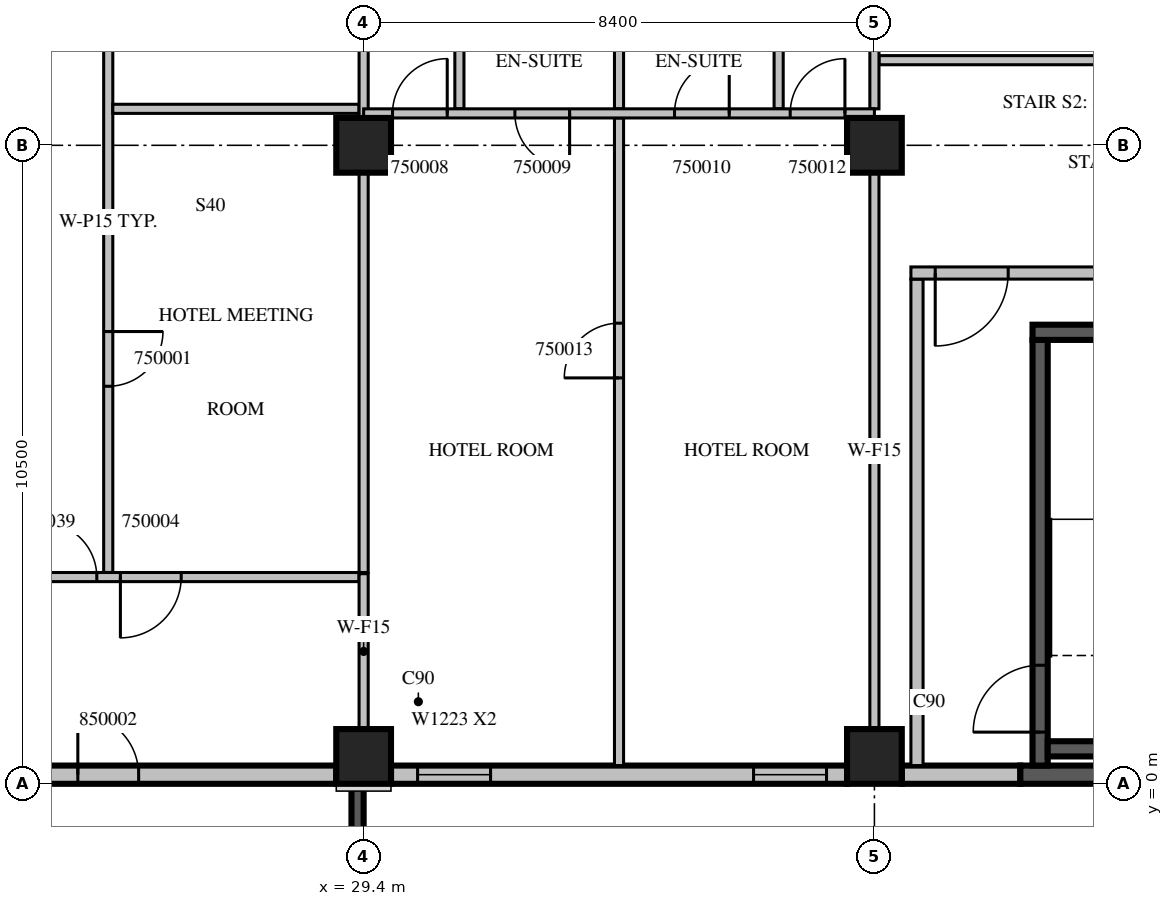
"""IFC4 building model, lengths in metres.
Left out: names, types, materials, properties, quantities, classifications, styles, units other than length and angle.
Written with IfcOpenShell. Run it as: python <this file> out.ifc"""

import sys

from ifc_helpers import new_model, si_unit, direction, frame, frame_2d, origin, origin_2d, place, context, subcontext, project, spatial, rectangle, extrude, source, transform, mapped, element, fill, save


model = new_model("IFC4")
c1 = context("Model", 3, precision=1e-05, world=origin(), true_north=direction((0.0, 1.0)))
c2 = subcontext(c1, "Body", "Model", "MODEL_VIEW")
j1 = project(units=[si_unit("LENGTHUNIT", "METRE"), si_unit("PLANEANGLEUNIT", "RADIAN")], contexts=[c1])
p1 = place(None, origin())
s1 = spatial("IfcSite", under=j1, at=p1, CompositionType="ELEMENT")
p2 = place(p1, origin())
s2 = spatial("IfcBuilding", under=s1, at=p2, CompositionType="ELEMENT")
p3 = place(p2, frame((0.0, 0.0, 223.4)))
s3 = spatial("IfcBuildingStorey", under=s2, at=p3, CompositionType="ELEMENT", Elevation=223.4)
m1 = source(origin(), c2, "Body", "SweptSolid", [
    extrude(rectangle(XDim=0.9, YDim=0.9, at=origin_2d()), origin(), (0.0, 0.0, 1.0), 3.8),
])
for number, where, z_axis, x_axis in (
    (1, (29.4, 0.45, 0.0), (0.0, 0.0, 1.0), (1.0, 0.0, 0.0)),
    (2, (37.8, 0.45, 0.0), (0.0, 0.0, 1.0), (1.0, 0.0, 0.0)),
    (3, (29.4, 10.5, 0.0), (0.0, 0.0, 1.0), (1.0, 0.0, 0.0)),
    (4, (37.8, 10.5, 0.0), (0.0, 0.0, 1.0), (1.0, 0.0, 0.0)),
):
    element("IfcColumn", number, at=place(p3, frame(where, z_axis=z_axis, x_axis=x_axis)), inside=s3, PredefinedType="COLUMN", context=c2, shape_type="MappedRepresentation", body=[
        mapped(m1, transform((0.0, 0.0, 0.0), scale=1.0)),
    ])
m2 = source(origin(), c2, "Body", "SweptSolid", [
    extrude(rectangle(XDim=3.9, YDim=0.2, at=frame_2d((1.95, 0.0))), origin(), (0.0, 0.0, 1.0), 3.4),
])
p4 = place(p3, frame((29.3, 0.0, 0.0), z_axis=(0.0, 0.0, 1.0), x_axis=(0.0, -1.0, 0.0)))
e5 = element("IfcWall", 5, at=p4, inside=s3, PredefinedType="SOLIDWALL", context=c2, shape_type="MappedRepresentation", body=[
    mapped(m2, transform((0.0, 0.0, 0.0), scale=1.0)),
])
m3 = source(origin(), c2, "Body", "SweptSolid", [
    extrude(rectangle(XDim=2.4, YDim=2.3, at=frame_2d((1.2, 1.15))), frame((0.0, 0.11, 0.0), z_axis=(0.0, -1.0, 0.0), x_axis=(1.0, 0.0, 0.0)), (0.0, 0.0, 1.0), 0.22),
])
p5 = place(p4, frame((0.75, 0.0, 0.6)))
e6 = element("IfcOpeningElement", 6, at=p5, cuts=e5, PredefinedType="OPENING", context=c2, shape_type="MappedRepresentation", body=[
    mapped(m3, transform((0.0, 0.0, 0.0), scale=1.0)),
])
m4 = source(origin(), c2, "Body", "SweptSolid", [
    extrude(rectangle(XDim=7.5, YDim=0.3, at=frame_2d((3.75, 0.0))), origin(), (0.0, 0.0, 1.0), 3.4),
])
p6 = place(p3, frame((21.45, 0.15, 0.0), z_axis=(0.0, 0.0, 1.0), x_axis=(1.0, 0.0, 0.0)))
e7 = element("IfcWall", 7, at=p6, inside=s3, PredefinedType="STANDARD", context=c2, shape_type="MappedRepresentation", body=[
    mapped(m4, transform((0.0, 0.0, 0.0), scale=1.0)),
])
m5 = source(origin(), c2, "Body", "SweptSolid", [
    extrude(rectangle(XDim=1.0, YDim=2.1, at=frame_2d((0.5, 1.05))), frame((0.0, 0.16, 0.0), z_axis=(0.0, -1.0, 0.0), x_axis=(1.0, 0.0, 0.0)), (0.0, 0.0, 1.0), 0.32),
])
p7 = place(p6, frame((3.25, 0.0, 0.0)))
e8 = element("IfcOpeningElement", 8, at=p7, cuts=e7, PredefinedType="OPENING", context=c2, shape_type="MappedRepresentation", body=[
    mapped(m5, transform((0.0, 0.0, 0.0), scale=1.0)),
])
p8 = place(p3, frame((29.85, 0.15, 0.0), z_axis=(0.0, 0.0, 1.0), x_axis=(1.0, 0.0, 0.0)))
e9 = element("IfcWall", 9, at=p8, inside=s3, PredefinedType="STANDARD", context=c2, shape_type="MappedRepresentation", body=[
    mapped(m4, transform((0.0, 0.0, 0.0), scale=1.0)),
])
m6 = source(origin(), c2, "Body", "SweptSolid", [
    extrude(rectangle(XDim=1.2, YDim=2.3, at=frame_2d((0.6, 1.15))), frame((0.0, 0.16, 0.0), z_axis=(0.0, -1.0, 0.0), x_axis=(1.0, 0.0, 0.0)), (0.0, 0.0, 1.0), 0.32),
])
p9 = place(p8, frame((0.438, 0.0, 0.6)))
e10 = element("IfcOpeningElement", 10, at=p9, cuts=e9, PredefinedType="OPENING", context=c2, shape_type="MappedRepresentation", body=[
    mapped(m6, transform((0.0, 0.0, 0.0), scale=1.0)),
])
p10 = place(p8, frame((5.963, 0.0, 0.6)))
e11 = element("IfcOpeningElement", 11, at=p10, cuts=e9, PredefinedType="OPENING", context=c2, shape_type="MappedRepresentation", body=[
    mapped(m6, transform((0.0, 0.0, 0.0), scale=1.0)),
])
m7 = source(origin(), c2, "Body", "SweptSolid", [
    extrude(rectangle(XDim=1.95, YDim=0.3, at=frame_2d((0.975, 0.0))), origin(), (0.0, 0.0, 1.0), 3.4),
])
p11 = place(p3, frame((38.25, 0.15, 0.0), z_axis=(0.0, 0.0, 1.0), x_axis=(1.0, 0.0, 0.0)))
e12 = element("IfcWall", 12, at=p11, inside=s3, PredefinedType="STANDARD", context=c2, shape_type="MappedRepresentation", body=[
    mapped(m7, transform((0.0, 0.0, 0.0), scale=1.0)),
])
m8 = source(origin(), c2, "Body", "SweptSolid", [
    extrude(rectangle(XDim=3.8, YDim=0.3, at=frame_2d((1.9, 0.0))), origin(), (0.0, 0.0, 1.0), 3.4),
])
p12 = place(p3, frame((40.2, 0.15, 0.0), z_axis=(0.0, 0.0, 1.0), x_axis=(1.0, 0.0, 0.0)))
e13 = element("IfcWall", 13, at=p12, inside=s3, PredefinedType="SOLIDWALL", context=c2, shape_type="MappedRepresentation", body=[
    mapped(m8, transform((0.0, 0.0, 0.0), scale=1.0)),
])
m9 = source(origin(), c2, "Body", "SweptSolid", [
    extrude(rectangle(XDim=7.0, YDim=0.25, at=frame_2d((3.5, 0.0))), origin(), (0.0, 0.0, 1.0), 3.4),
])
p13 = place(p3, frame((40.525, 0.3, 0.0), z_axis=(0.0, 0.0, 1.0), x_axis=(0.0, 1.0, 0.0)))
e14 = element("IfcWall", 14, at=p13, inside=s3, PredefinedType="SOLIDWALL", context=c2, shape_type="MappedRepresentation", body=[
    mapped(m9, transform((0.0, 0.0, 0.0), scale=1.0)),
])
m10 = source(origin(), c2, "Body", "SweptSolid", [
    extrude(rectangle(XDim=1.1, YDim=2.1, at=frame_2d((0.55, 1.05))), frame((0.0, 0.135, 0.0), z_axis=(0.0, -1.0, 0.0), x_axis=(1.0, 0.0, 0.0)), (0.0, 0.0, 1.0), 0.27),
])
p14 = place(p13, frame((0.55, 0.0, 0.0)))
e15 = element("IfcOpeningElement", 15, at=p14, cuts=e14, PredefinedType="OPENING", context=c2, shape_type="MappedRepresentation", body=[
    mapped(m10, transform((0.0, 0.0, 0.0), scale=1.0)),
])
m11 = source(origin(), c2, "Body", "SweptSolid", [
    extrude(rectangle(XDim=3.45, YDim=0.25, at=frame_2d((1.725, 0.0))), origin(), (0.0, 0.0, 1.0), 3.4),
])
p15 = place(p3, frame((40.4, 7.425, 0.0), z_axis=(0.0, 0.0, 1.0), x_axis=(1.0, 0.0, 0.0)))
e16 = element("IfcWall", 16, at=p15, inside=s3, PredefinedType="SOLIDWALL", context=c2, shape_type="MappedRepresentation", body=[
    mapped(m11, transform((0.0, 0.0, 0.0), scale=1.0)),
])
m12 = source(origin(), c2, "Body", "SweptSolid", [
    extrude(rectangle(XDim=2.95, YDim=0.25, at=frame_2d((1.475, 0.0))), origin(), (0.0, 0.0, 1.0), 3.4),
])
p16 = place(p3, frame((40.65, 0.575, 0.0), z_axis=(0.0, 0.0, 1.0), x_axis=(1.0, 0.0, 0.0)))
e17 = element("IfcWall", 17, at=p16, inside=s3, PredefinedType="SOLIDWALL", context=c2, shape_type="MappedRepresentation", body=[
    mapped(m12, transform((0.0, 0.0, 0.0), scale=1.0)),
])
m13 = source(origin(), c2, "Body", "SweptSolid", [
    extrude(rectangle(XDim=8.0, YDim=0.2, at=frame_2d((4.0, 0.0))), origin(), (0.0, 0.0, 1.0), 3.4),
])
p17 = place(p3, frame((38.5, 0.3, 0.0), z_axis=(0.0, 0.0, 1.0), x_axis=(0.0, 1.0, 0.0)))
e18 = element("IfcWall", 18, at=p17, inside=s3, PredefinedType="PARTITIONING", context=c2, shape_type="MappedRepresentation", body=[
    mapped(m13, transform((0.0, 0.0, 0.0), scale=1.0)),
])
m14 = source(origin(), c2, "Body", "SweptSolid", [
    extrude(rectangle(XDim=5.45, YDim=0.2, at=frame_2d((2.725, 0.0))), origin(), (0.0, 0.0, 1.0), 3.4),
])
p18 = place(p3, frame((38.4, 8.4, 0.0), z_axis=(0.0, 0.0, 1.0), x_axis=(1.0, 0.0, 0.0)))
e19 = element("IfcWall", 19, at=p18, inside=s3, PredefinedType="PARTITIONING", context=c2, shape_type="MappedRepresentation", body=[
    mapped(m14, transform((0.0, 0.0, 0.0), scale=1.0)),
])
m15 = source(origin(), c2, "Body", "SweptSolid", [
    extrude(rectangle(XDim=1.2, YDim=2.1, at=frame_2d((0.6, 1.05))), frame((0.0, 0.11, 0.0), z_axis=(0.0, -1.0, 0.0), x_axis=(1.0, 0.0, 0.0)), (0.0, 0.0, 1.0), 0.22),
])
p19 = place(p18, frame((0.4, 0.0, 0.0)))
e20 = element("IfcOpeningElement", 20, at=p19, cuts=e19, PredefinedType="OPENING", context=c2, shape_type="MappedRepresentation", body=[
    mapped(m15, transform((0.0, 0.0, 0.0), scale=1.0)),
])
m16 = source(origin(), c2, "Body", "SweptSolid", [
    extrude(rectangle(XDim=0.9, YDim=2.1, at=frame_2d((0.45, 1.05))), frame((0.0, 0.11, 0.0), z_axis=(0.0, -1.0, 0.0), x_axis=(1.0, 0.0, 0.0)), (0.0, 0.0, 1.0), 0.22),
])
p20 = place(p18, frame((3.25, 0.0, 0.0)))
e21 = element("IfcOpeningElement", 21, at=p20, cuts=e19, PredefinedType="OPENING", context=c2, shape_type="MappedRepresentation", body=[
    mapped(m16, transform((0.0, 0.0, 0.0), scale=1.0)),
])
m17 = source(origin(), c2, "Body", "SweptSolid", [
    extrude(rectangle(XDim=11.525, YDim=0.15, at=frame_2d((5.763, 0.0))), origin(), (0.0, 0.0, 1.0), 3.4),
])
p21 = place(p3, frame((25.2, 15.0, 0.0), z_axis=(0.0, 0.0, 1.0), x_axis=(0.0, -1.0, 0.0)))
e22 = element("IfcWall", 22, at=p21, inside=s3, PredefinedType="PARTITIONING", context=c2, shape_type="MappedRepresentation", body=[
    mapped(m17, transform((0.0, 0.0, 0.0), scale=1.0)),
])
m18 = source(origin(), c2, "Body", "SweptSolid", [
    extrude(rectangle(XDim=0.9, YDim=2.1, at=frame_2d((0.45, 1.05))), frame((0.0, 0.085, 0.0), z_axis=(0.0, -1.0, 0.0), x_axis=(1.0, 0.0, 0.0)), (0.0, 0.0, 1.0), 0.17),
])
p22 = place(p21, frame((7.562, 0.0, 0.0)))
e23 = element("IfcOpeningElement", 23, at=p22, cuts=e22, PredefinedType="OPENING", context=c2, shape_type="MappedRepresentation", body=[
    mapped(m18, transform((0.0, 0.0, 0.0), scale=1.0)),
])
p23 = place(p21, frame((0.925, 0.0, 0.0)))
e24 = element("IfcOpeningElement", 24, at=p23, cuts=e22, PredefinedType="OPENING", context=c2, shape_type="MappedRepresentation", body=[
    mapped(m18, transform((0.0, 0.0, 0.0), scale=1.0)),
])
p24 = place(p3, frame((29.325, 11.1, 0.0), z_axis=(0.0, 0.0, 1.0), x_axis=(-1.0, 0.0, 0.0)))
e25 = element("IfcWall", 25, at=p24, inside=s3, PredefinedType="PARTITIONING", context=c2, shape_type="SweptSolid", body=[
    extrude(rectangle(XDim=4.05, YDim=0.15, at=frame_2d((2.025, 0.0))), origin(), (0.0, 0.0, 1.0), 3.4),
])
m19 = source(origin(), c2, "Body", "SweptSolid", [
    extrude(rectangle(XDim=6.576, YDim=0.15, at=frame_2d((3.288, 0.0))), origin(), (0.0, 0.0, 1.0), 3.4),
])
p25 = place(p3, frame((29.4, 3.475, 0.0), z_axis=(0.0, 0.0, 1.0), x_axis=(0.0, 1.0, 0.0)))
e26 = element("IfcWall", 26, at=p25, inside=s3, PredefinedType="PARTITIONING", context=c2, shape_type="MappedRepresentation", body=[
    mapped(m19, transform((0.0, 0.0, 0.0), scale=1.0)),
])
m20 = source(origin(), c2, "Body", "SweptSolid", [
    extrude(rectangle(XDim=4.051, YDim=0.15, at=frame_2d((2.026, 0.0))), origin(), (0.0, 0.0, 1.0), 3.4),
])
p26 = place(p3, frame((29.4, 10.949, 0.0), z_axis=(0.0, 0.0, 1.0), x_axis=(0.0, 1.0, 0.0)))
e27 = element("IfcWall", 27, at=p26, inside=s3, PredefinedType="PARTITIONING", context=c2, shape_type="MappedRepresentation", body=[
    mapped(m20, transform((0.0, 0.0, 0.0), scale=1.0)),
])
m21 = source(origin(), c2, "Body", "SweptSolid", [
    extrude(rectangle(XDim=7.525, YDim=0.15, at=frame_2d((3.763, 0.0))), origin(), (0.0, 0.0, 1.0), 3.4),
])
p27 = place(p3, frame((21.8, 3.4, 0.0), z_axis=(0.0, 0.0, 1.0), x_axis=(1.0, 0.0, 0.0)))
e28 = element("IfcWall", 28, at=p27, inside=s3, PredefinedType="PARTITIONING", context=c2, shape_type="MappedRepresentation", body=[
    mapped(m21, transform((0.0, 0.0, 0.0), scale=1.0)),
])
m22 = source(origin(), c2, "Body", "SweptSolid", [
    extrude(rectangle(XDim=1.0, YDim=2.1, at=frame_2d((0.5, 1.05))), frame((0.0, 0.085, 0.0), z_axis=(0.0, -1.0, 0.0), x_axis=(1.0, 0.0, 0.0)), (0.0, 0.0, 1.0), 0.17),
])
p28 = place(p27, frame((3.6, 0.0, 0.0)))
e29 = element("IfcOpeningElement", 29, at=p28, cuts=e28, PredefinedType="OPENING", context=c2, shape_type="MappedRepresentation", body=[
    mapped(m22, transform((0.0, 0.0, 0.0), scale=1.0)),
])
p29 = place(p27, frame((2.312, 0.0, 0.0)))
e30 = element("IfcOpeningElement", 30, at=p29, cuts=e28, PredefinedType="OPENING", context=c2, shape_type="MappedRepresentation", body=[
    mapped(m18, transform((0.0, 0.0, 0.0), scale=1.0)),
])
m23 = source(origin(), c2, "Body", "SweptSolid", [
    extrude(rectangle(XDim=6.45, YDim=0.15, at=frame_2d((3.225, 0.0))), origin(), (0.0, 0.0, 1.0), 3.4),
])
p30 = place(p3, frame((37.875, 11.9, 0.0), z_axis=(0.0, 0.0, 1.0), x_axis=(1.0, 0.0, 0.0)))
e31 = element("IfcWall", 31, at=p30, inside=s3, PredefinedType="PARTITIONING", context=c2, shape_type="MappedRepresentation", body=[
    mapped(m23, transform((0.0, 0.0, 0.0), scale=1.0)),
])
m24 = source(origin(), c2, "Body", "SweptSolid", [
    extrude(rectangle(XDim=10.65, YDim=0.15, at=frame_2d((5.325, 0.0))), origin(), (0.0, 0.0, 1.0), 3.4),
])
p31 = place(p3, frame((33.6, 0.3, 0.0), z_axis=(0.0, 0.0, 1.0), x_axis=(0.0, 1.0, 0.0)))
e32 = element("IfcWall", 32, at=p31, inside=s3, PredefinedType="PARTITIONING", context=c2, shape_type="MappedRepresentation", body=[
    mapped(m24, transform((0.0, 0.0, 0.0), scale=1.0)),
])
p32 = place(p31, frame((6.375, 0.0, 0.0)))
e33 = element("IfcOpeningElement", 33, at=p32, cuts=e32, PredefinedType="OPENING", context=c2, shape_type="MappedRepresentation", body=[
    mapped(m18, transform((0.0, 0.0, 0.0), scale=1.0)),
])
m25 = source(origin(), c2, "Body", "SweptSolid", [
    extrude(rectangle(XDim=3.9, YDim=0.15, at=frame_2d((1.95, 0.0))), origin(), (0.0, 0.0, 1.0), 3.4),
])
for number, where, z_axis, x_axis in (
    (34, (30.975, 11.1, 0.0), (0.0, 0.0, 1.0), (0.0, 1.0, 0.0)),
    (35, (33.6, 11.1, 0.0), (0.0, 0.0, 1.0), (0.0, 1.0, 0.0)),
    (36, (36.225, 11.1, 0.0), (0.0, 0.0, 1.0), (0.0, 1.0, 0.0)),
):
    element("IfcWall", number, at=place(p3, frame(where, z_axis=z_axis, x_axis=x_axis)), inside=s3, PredefinedType="PARTITIONING", context=c2, shape_type="MappedRepresentation", body=[
        mapped(m25, transform((0.0, 0.0, 0.0), scale=1.0)),
    ])
m26 = source(origin(), c2, "Body", "SweptSolid", [
    extrude(rectangle(XDim=2.556, YDim=0.15, at=frame_2d((1.278, 0.0))), origin(), (0.0, 0.0, 1.0), 3.4),
])
p33 = place(p3, frame((29.4, 0.899, 0.0), z_axis=(0.0, 0.0, 1.0), x_axis=(0.0, 1.0, 0.0)))
e37 = element("IfcWall", 37, at=p33, inside=s3, PredefinedType="PARTITIONING", context=c2, shape_type="MappedRepresentation", body=[
    mapped(m26, transform((0.0, 0.0, 0.0), scale=1.0)),
])
m27 = source(origin(), c2, "Body", "SweptSolid", [
    extrude(rectangle(XDim=9.152, YDim=0.15, at=frame_2d((4.576, 0.0))), origin(), (0.0, 0.0, 1.0), 3.4),
])
p34 = place(p3, frame((37.8, 0.899, 0.0), z_axis=(0.0, 0.0, 1.0), x_axis=(0.0, 1.0, 0.0)))
e38 = element("IfcWall", 38, at=p34, inside=s3, PredefinedType="PARTITIONING", context=c2, shape_type="MappedRepresentation", body=[
    mapped(m27, transform((0.0, 0.0, 0.0), scale=1.0)),
])
p35 = place(p3, frame((37.8, 11.1, 0.0), z_axis=(0.0, 0.0, 1.0), x_axis=(0.0, 1.0, 0.0)))
e39 = element("IfcWall", 39, at=p35, inside=s3, PredefinedType="PARTITIONING", context=c2, shape_type="MappedRepresentation", body=[
    mapped(m25, transform((0.0, 0.0, 0.0), scale=1.0)),
])
m28 = source(origin(), c2, "Body", "SweptSolid", [
    extrude(rectangle(XDim=8.4, YDim=0.15, at=frame_2d((4.2, 0.0))), origin(), (0.0, 0.0, 1.0), 3.4),
])
p36 = place(p3, frame((37.8, 11.025, 0.0), z_axis=(0.0, 0.0, 1.0), x_axis=(-1.0, 0.0, 0.0)))
e40 = element("IfcWall", 40, at=p36, inside=s3, PredefinedType="PARTITIONING", context=c2, shape_type="MappedRepresentation", body=[
    mapped(m28, transform((0.0, 0.0, 0.0), scale=1.0)),
])
p37 = place(p36, frame((7.025, 0.0, 0.0)))
e41 = element("IfcOpeningElement", 41, at=p37, cuts=e40, PredefinedType="OPENING", context=c2, shape_type="MappedRepresentation", body=[
    mapped(m18, transform((0.0, 0.0, 0.0), scale=1.0)),
])
p38 = place(p36, frame((5.013, 0.0, 0.0)))
e42 = element("IfcOpeningElement", 42, at=p38, cuts=e40, PredefinedType="OPENING", context=c2, shape_type="MappedRepresentation", body=[
    mapped(m18, transform((0.0, 0.0, 0.0), scale=1.0)),
])
p39 = place(p36, frame((2.388, 0.0, 0.0)))
e43 = element("IfcOpeningElement", 43, at=p39, cuts=e40, PredefinedType="OPENING", context=c2, shape_type="MappedRepresentation", body=[
    mapped(m18, transform((0.0, 0.0, 0.0), scale=1.0)),
])
p40 = place(p36, frame((0.485, 0.0, 0.0)))
e44 = element("IfcOpeningElement", 44, at=p40, cuts=e40, PredefinedType="OPENING", context=c2, shape_type="MappedRepresentation", body=[
    mapped(m18, transform((0.0, 0.0, 0.0), scale=1.0)),
])
m29 = source(origin(), c2, "Body", "SweptSolid", [
    extrude(rectangle(XDim=1.2, YDim=2.3, at=frame_2d((0.6, 1.15))), frame((0.0, 0.03, 0.0), z_axis=(0.0, -1.0, 0.0), x_axis=(1.0, 0.0, 0.0)), (0.0, 0.0, 1.0), 0.06),
])
p41 = place(p9, origin())
e45 = element("IfcWindow", 45, at=p41, inside=s3, PartitioningType="SINGLE_PANEL", PredefinedType="WINDOW", context=c2, shape_type="MappedRepresentation", body=[
    mapped(m29, transform((0.0, 0.0, 0.0), scale=1.0)),
])
fill(e10, e45)
p42 = place(p10, origin())
e46 = element("IfcWindow", 46, at=p42, inside=s3, PartitioningType="SINGLE_PANEL", PredefinedType="WINDOW", context=c2, shape_type="MappedRepresentation", body=[
    mapped(m29, transform((0.0, 0.0, 0.0), scale=1.0)),
])
fill(e11, e46)
m30 = source(origin(), c2, "Body", "SweptSolid", [
    extrude(rectangle(XDim=1.1, YDim=2.1, at=frame_2d((0.55, 1.05))), frame((0.0, 0.025, 0.0), z_axis=(0.0, -1.0, 0.0), x_axis=(1.0, 0.0, 0.0)), (0.0, 0.0, 1.0), 0.05),
])
p43 = place(p14, origin())
e47 = element("IfcDoor", 47, at=p43, inside=s3, OperationType="SINGLE_SWING_LEFT", PredefinedType="DOOR", context=c2, shape_type="MappedRepresentation", body=[
    mapped(m30, transform((0.0, 0.0, 0.0), scale=1.0)),
])
fill(e15, e47)
m31 = source(origin(), c2, "Body", "SweptSolid", [
    extrude(rectangle(XDim=1.2, YDim=2.1, at=frame_2d((0.6, 1.05))), frame((0.0, 0.025, 0.0), z_axis=(0.0, -1.0, 0.0), x_axis=(1.0, 0.0, 0.0)), (0.0, 0.0, 1.0), 0.05),
])
p44 = place(p19, origin())
e48 = element("IfcDoor", 48, at=p44, inside=s3, OperationType="SINGLE_SWING_RIGHT", PredefinedType="DOOR", context=c2, shape_type="MappedRepresentation", body=[
    mapped(m31, transform((0.0, 0.0, 0.0), scale=1.0)),
])
fill(e20, e48)
m32 = source(origin(), c2, "Body", "SweptSolid", [
    extrude(rectangle(XDim=0.9, YDim=2.1, at=frame_2d((0.45, 1.05))), frame((0.0, 0.025, 0.0), z_axis=(0.0, -1.0, 0.0), x_axis=(1.0, 0.0, 0.0)), (0.0, 0.0, 1.0), 0.05),
])
p45 = place(p22, origin())
e49 = element("IfcDoor", 49, at=p45, inside=s3, OperationType="SINGLE_SWING_LEFT", PredefinedType="DOOR", context=c2, shape_type="MappedRepresentation", body=[
    mapped(m32, transform((0.0, 0.0, 0.0), scale=1.0)),
])
fill(e23, e49)
m33 = source(origin(), c2, "Body", "SweptSolid", [
    extrude(rectangle(XDim=1.0, YDim=2.1, at=frame_2d((0.5, 1.05))), frame((0.0, 0.025, 0.0), z_axis=(0.0, -1.0, 0.0), x_axis=(1.0, 0.0, 0.0)), (0.0, 0.0, 1.0), 0.05),
])
p46 = place(p28, origin())
e50 = element("IfcDoor", 50, at=p46, inside=s3, OperationType="SINGLE_SWING_RIGHT", PredefinedType="DOOR", context=c2, shape_type="MappedRepresentation", body=[
    mapped(m33, transform((0.0, 0.0, 0.0), scale=1.0)),
])
fill(e29, e50)
p47 = place(p37, origin())
e51 = element("IfcDoor", 51, at=p47, inside=s3, OperationType="SINGLE_SWING_RIGHT", PredefinedType="DOOR", context=c2, shape_type="MappedRepresentation", body=[
    mapped(m32, transform((0.0, 0.0, 0.0), scale=1.0)),
])
fill(e41, e51)
p48 = place(p38, origin())
e52 = element("IfcDoor", 52, at=p48, inside=s3, OperationType="SINGLE_SWING_LEFT", PredefinedType="DOOR", context=c2, shape_type="MappedRepresentation", body=[
    mapped(m32, transform((0.0, 0.0, 0.0), scale=1.0)),
])
fill(e42, e52)
p49 = place(p39, origin())
e53 = element("IfcDoor", 53, at=p49, inside=s3, OperationType="SINGLE_SWING_RIGHT", PredefinedType="DOOR", context=c2, shape_type="MappedRepresentation", body=[
    mapped(m32, transform((0.0, 0.0, 0.0), scale=1.0)),
])
fill(e43, e53)
p50 = place(p40, origin())
e54 = element("IfcDoor", 54, at=p50, inside=s3, OperationType="SINGLE_SWING_RIGHT", PredefinedType="DOOR", context=c2, shape_type="MappedRepresentation", body=[
    mapped(m32, transform((0.0, 0.0, 0.0), scale=1.0)),
])
fill(e44, e54)
p51 = place(p32, origin())
e55 = element("IfcDoor", 55, at=p51, inside=s3, OperationType="SINGLE_SWING_LEFT", PredefinedType="DOOR", context=c2, shape_type="MappedRepresentation", body=[
    mapped(m32, transform((0.0, 0.0, 0.0), scale=1.0)),
])
fill(e33, e55)
p52 = place(p29, origin())
e56 = element("IfcDoor", 56, at=p52, inside=s3, OperationType="SINGLE_SWING_LEFT", PredefinedType="DOOR", context=c2, shape_type="MappedRepresentation", body=[
    mapped(m32, transform((0.0, 0.0, 0.0), scale=1.0)),
])
fill(e30, e56)
p53 = place(p7, origin())
e57 = element("IfcDoor", 57, at=p53, inside=s3, OperationType="SINGLE_SWING_LEFT", PredefinedType="DOOR", context=c2, shape_type="MappedRepresentation", body=[
    mapped(m33, transform((0.0, 0.0, 0.0), scale=1.0)),
])
fill(e8, e57)
save(model, sys.argv[1])
